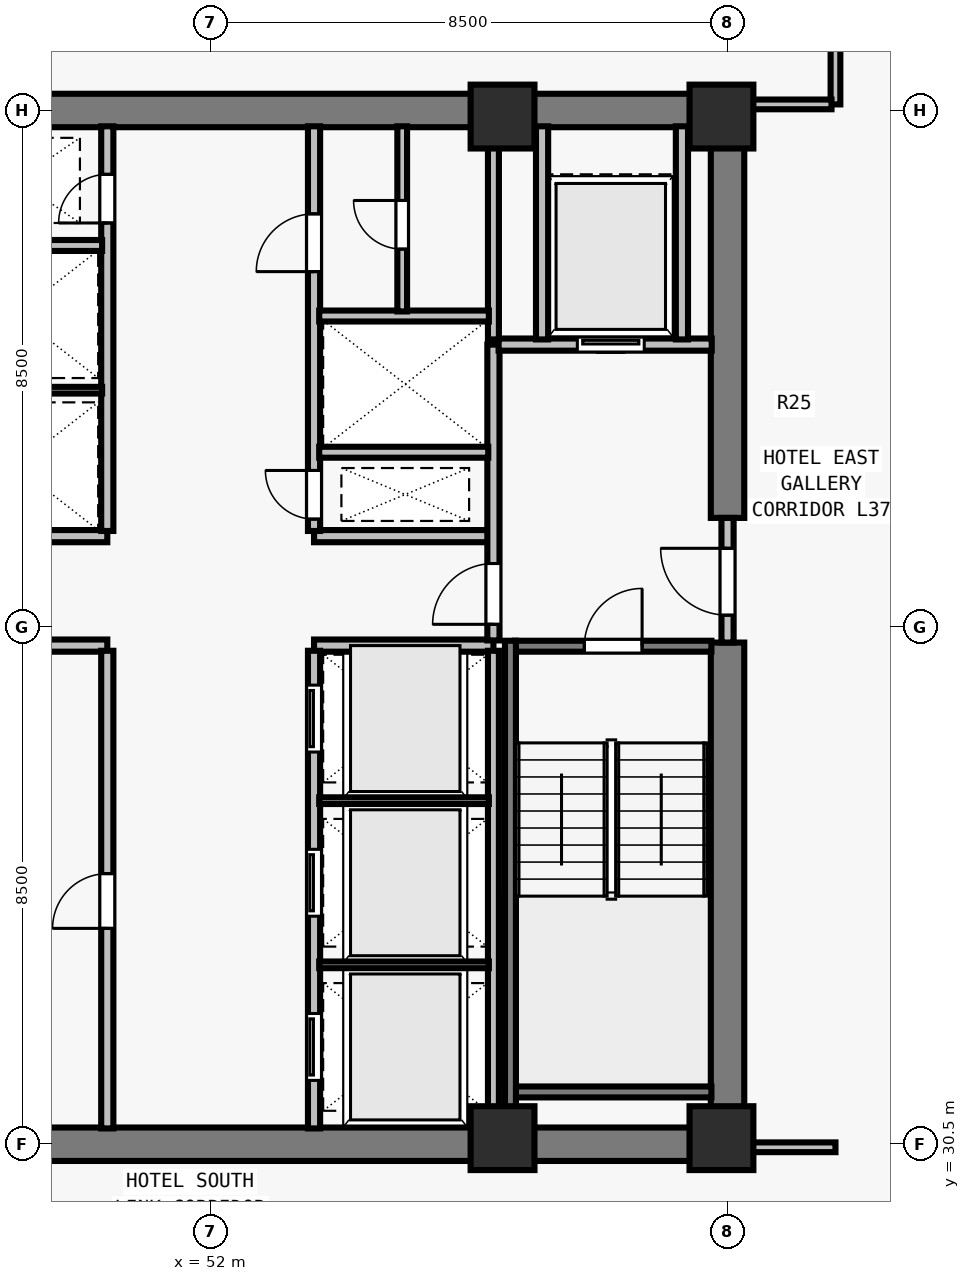
"""IFC4 building model, lengths in metres.
Left out: names, types, materials, properties, quantities, classifications, styles, units other than length and angle.
Written with IfcOpenShell. Run it as: python <this file> out.ifc"""

import sys

from ifc_helpers import new_model, si_unit, direction, frame, frame_2d, origin, origin_2d, place, context, subcontext, project, spatial, rectangle, extrude, element, fill, save


model = new_model("IFC4")
c1 = context("Model", 3, precision=1e-05, world=origin(), true_north=direction((0.0, 1.0)))
c2 = subcontext(c1, "Body", "Model", "MODEL_VIEW")
j1 = project(units=[si_unit("LENGTHUNIT", "METRE"), si_unit("PLANEANGLEUNIT", "RADIAN")], contexts=[c1])
p1 = place(None, origin())
s1 = spatial("IfcSite", under=j1, at=p1, CompositionType="ELEMENT")
p2 = place(p1, origin())
s2 = spatial("IfcBuilding", under=s1, at=p2, CompositionType="ELEMENT")
p3 = place(p2, frame((0.0, 0.0, 137.5)))
s3 = spatial("IfcBuildingStorey", under=s2, at=p3, CompositionType="ELEMENT", Elevation=137.5)
for number, where, z_axis, x_axis in (
    (1, (56.8, 30.6, 0.0), (0.0, 0.0, 1.0), (1.0, 0.0, 0.0)),
    (2, (60.4, 30.6, 0.0), (0.0, 0.0, 1.0), (1.0, 0.0, 0.0)),
    (3, (56.8, 47.4, 0.0), (0.0, 0.0, 1.0), (1.0, 0.0, 0.0)),
    (4, (60.4, 47.4, 0.0), (0.0, 0.0, 1.0), (1.0, 0.0, 0.0)),
):
    element("IfcColumn", number, at=place(p3, frame(where, z_axis=z_axis, x_axis=x_axis)), inside=s3, PredefinedType="COLUMN", context=c2, shape_type="SweptSolid", body=[
        extrude(rectangle(XDim=1.05, YDim=1.05, at=origin_2d()), origin(), (0.0, 0.0, 1.0), 3.5),
    ])
for number, where, z_axis, x_axis in (
    (5, (43.225, 30.5, 0.0), (0.0, 0.0, 1.0), (1.0, 0.0, 0.0)),
    (6, (43.225, 47.5, 0.0), (0.0, 0.0, 1.0), (1.0, 0.0, 0.0)),
):
    element("IfcWall", number, at=place(p3, frame(where, z_axis=z_axis, x_axis=x_axis)), inside=s3, PredefinedType="SHEAR", context=c2, shape_type="SweptSolid", body=[
        extrude(rectangle(XDim=17.55, YDim=0.55, at=frame_2d((8.775, 0.0))), origin(), (0.0, 0.0, 1.0), 3.28),
    ])
p4 = place(p3, frame((60.5, 30.765, 0.0), z_axis=(0.0, 0.0, 1.0), x_axis=(0.0, 1.0, 0.0)))
e7 = element("IfcWall", 7, at=p4, inside=s3, PredefinedType="SHEAR", context=c2, shape_type="SweptSolid", body=[
    extrude(rectangle(XDim=7.985, YDim=0.55, at=frame_2d((3.993, 0.0))), origin(), (0.0, 0.0, 1.0), 3.28),
])
p5 = place(p3, frame((60.5, 40.8, 0.0), z_axis=(0.0, 0.0, 1.0), x_axis=(0.0, 1.0, 0.0)))
e8 = element("IfcWall", 8, at=p5, inside=s3, PredefinedType="SHEAR", context=c2, shape_type="SweptSolid", body=[
    extrude(rectangle(XDim=6.435, YDim=0.55, at=frame_2d((3.218, 0.0))), origin(), (0.0, 0.0, 1.0), 3.28),
])
for number, where, z_axis, x_axis in (
    (9, (47.35, 38.7, 0.0), (0.0, 0.0, 1.0), (1.0, 0.0, 0.0)),
    (10, (47.35, 40.5, 0.0), (0.0, 0.0, 1.0), (1.0, 0.0, 0.0)),
    (11, (53.7, 38.7, 0.0), (0.0, 0.0, 1.0), (1.0, 0.0, 0.0)),
    (12, (53.7, 40.5, 0.0), (0.0, 0.0, 1.0), (1.0, 0.0, 0.0)),
):
    element("IfcWall", number, at=place(p3, frame(where, z_axis=z_axis, x_axis=x_axis)), inside=s3, PredefinedType="SOLIDWALL", context=c2, shape_type="SweptSolid", body=[
        extrude(rectangle(XDim=2.95, YDim=0.2, at=frame_2d((1.475, 0.0))), origin(), (0.0, 0.0, 1.0), 3.28),
    ])
p6 = place(p3, frame((50.3, 30.76, 0.0), z_axis=(0.0, 0.0, 1.0), x_axis=(0.0, 1.0, 0.0)))
e13 = element("IfcWall", 13, at=p6, inside=s3, PredefinedType="SOLIDWALL", context=c2, shape_type="SweptSolid", body=[
    extrude(rectangle(XDim=7.855, YDim=0.2, at=frame_2d((3.927, 0.0))), origin(), (0.0, 0.0, 1.0), 3.28),
])
p7 = place(p6, frame((3.29, 0.0, 0.0)))
e14 = element("IfcOpeningElement", 14, at=p7, cuts=e13, PredefinedType="OPENING", context=c2, shape_type="SweptSolid", body=[
    extrude(rectangle(XDim=0.9, YDim=2.12, at=frame_2d((0.45, 1.06))), frame((0.0, 0.11, 0.0), z_axis=(0.0, -1.0, 0.0), x_axis=(1.0, 0.0, 0.0)), (0.0, 0.0, 1.0), 0.22),
])
p8 = place(p3, frame((53.7, 30.76, 0.0), z_axis=(0.0, 0.0, 1.0), x_axis=(0.0, 1.0, 0.0)))
e15 = element("IfcWall", 15, at=p8, inside=s3, PredefinedType="SOLIDWALL", context=c2, shape_type="SweptSolid", body=[
    extrude(rectangle(XDim=7.855, YDim=0.2, at=frame_2d((3.927, 0.0))), origin(), (0.0, 0.0, 1.0), 3.28),
])
p9 = place(p8, frame((0.79, 0.0, 0.0)))
e16 = element("IfcOpeningElement", 16, at=p9, cuts=e15, PredefinedType="OPENING", context=c2, shape_type="SweptSolid", body=[
    extrude(rectangle(XDim=1.1, YDim=2.2, at=frame_2d((0.55, 1.1))), frame((0.0, 0.11, 0.0), z_axis=(0.0, -1.0, 0.0), x_axis=(1.0, 0.0, 0.0)), (0.0, 0.0, 1.0), 0.22),
])
p10 = place(p8, frame((3.49, 0.0, 0.0)))
e17 = element("IfcOpeningElement", 17, at=p10, cuts=e15, PredefinedType="OPENING", context=c2, shape_type="SweptSolid", body=[
    extrude(rectangle(XDim=1.1, YDim=2.2, at=frame_2d((0.55, 1.1))), frame((0.0, 0.11, 0.0), z_axis=(0.0, -1.0, 0.0), x_axis=(1.0, 0.0, 0.0)), (0.0, 0.0, 1.0), 0.22),
])
p11 = place(p8, frame((6.19, 0.0, 0.0)))
e18 = element("IfcOpeningElement", 18, at=p11, cuts=e15, PredefinedType="OPENING", context=c2, shape_type="SweptSolid", body=[
    extrude(rectangle(XDim=1.1, YDim=2.2, at=frame_2d((0.55, 1.1))), frame((0.0, 0.11, 0.0), z_axis=(0.0, -1.0, 0.0), x_axis=(1.0, 0.0, 0.0)), (0.0, 0.0, 1.0), 0.22),
])
p12 = place(p3, frame((50.3, 40.585, 0.0), z_axis=(0.0, 0.0, 1.0), x_axis=(0.0, 1.0, 0.0)))
e19 = element("IfcWall", 19, at=p12, inside=s3, PredefinedType="SOLIDWALL", context=c2, shape_type="SweptSolid", body=[
    extrude(rectangle(XDim=6.655, YDim=0.2, at=frame_2d((3.328, 0.0))), origin(), (0.0, 0.0, 1.0), 3.28),
])
p13 = place(p12, frame((5.065, 0.0, 0.0)))
e20 = element("IfcOpeningElement", 20, at=p13, cuts=e19, PredefinedType="OPENING", context=c2, shape_type="SweptSolid", body=[
    extrude(rectangle(XDim=0.8, YDim=2.08, at=frame_2d((0.4, 1.04))), frame((0.0, 0.11, 0.0), z_axis=(0.0, -1.0, 0.0), x_axis=(1.0, 0.0, 0.0)), (0.0, 0.0, 1.0), 0.22),
])
p14 = place(p3, frame((53.7, 40.585, 0.0), z_axis=(0.0, 0.0, 1.0), x_axis=(0.0, 1.0, 0.0)))
e21 = element("IfcWall", 21, at=p14, inside=s3, PredefinedType="SOLIDWALL", context=c2, shape_type="SweptSolid", body=[
    extrude(rectangle(XDim=6.655, YDim=0.2, at=frame_2d((3.328, 0.0))), origin(), (0.0, 0.0, 1.0), 3.28),
])
p15 = place(p14, frame((0.195, 0.0, 0.0)))
e22 = element("IfcOpeningElement", 22, at=p15, cuts=e21, PredefinedType="OPENING", context=c2, shape_type="SweptSolid", body=[
    extrude(rectangle(XDim=0.8, YDim=2.08, at=frame_2d((0.4, 1.04))), frame((0.0, 0.11, 0.0), z_axis=(0.0, -1.0, 0.0), x_axis=(1.0, 0.0, 0.0)), (0.0, 0.0, 1.0), 0.22),
])
p16 = place(p14, frame((4.265, 0.0, 0.0)))
e23 = element("IfcOpeningElement", 23, at=p16, cuts=e21, PredefinedType="OPENING", context=c2, shape_type="SweptSolid", body=[
    extrude(rectangle(XDim=0.95, YDim=2.12, at=frame_2d((0.475, 1.06))), frame((0.0, 0.11, 0.0), z_axis=(0.0, -1.0, 0.0), x_axis=(1.0, 0.0, 0.0)), (0.0, 0.0, 1.0), 0.22),
])
p17 = place(p3, frame((60.5, 38.75, 0.0), z_axis=(0.0, 0.0, 1.0), x_axis=(0.0, 1.0, 0.0)))
e24 = element("IfcWall", 24, at=p17, inside=s3, PredefinedType="SOLIDWALL", context=c2, shape_type="SweptSolid", body=[
    extrude(rectangle(XDim=2.05, YDim=0.2, at=frame_2d((1.025, 0.0))), origin(), (0.0, 0.0, 1.0), 3.28),
])
p18 = place(p17, frame((0.45, 0.0, 0.0)))
e25 = element("IfcOpeningElement", 25, at=p18, cuts=e24, PredefinedType="OPENING", context=c2, shape_type="SweptSolid", body=[
    extrude(rectangle(XDim=1.1, YDim=2.15, at=frame_2d((0.55, 1.075))), frame((0.0, 0.11, 0.0), z_axis=(0.0, -1.0, 0.0), x_axis=(1.0, 0.0, 0.0)), (0.0, 0.0, 1.0), 0.22),
])
p19 = place(p3, frame((56.65, 38.785, 0.0), z_axis=(0.0, 0.0, 1.0), x_axis=(0.0, 1.0, 0.0)))
e26 = element("IfcWall", 26, at=p19, inside=s3, PredefinedType="SOLIDWALL", context=c2, shape_type="SweptSolid", body=[
    extrude(rectangle(XDim=4.865, YDim=0.2, at=frame_2d((2.433, 0.0))), origin(), (0.0, 0.0, 1.0), 3.28),
])
p20 = place(p19, frame((0.265, 0.0, 0.0)))
e27 = element("IfcOpeningElement", 27, at=p20, cuts=e26, PredefinedType="OPENING", context=c2, shape_type="SweptSolid", body=[
    extrude(rectangle(XDim=1.0, YDim=2.15, at=frame_2d((0.5, 1.075))), frame((0.0, 0.11, 0.0), z_axis=(0.0, -1.0, 0.0), x_axis=(1.0, 0.0, 0.0)), (0.0, 0.0, 1.0), 0.22),
])
p21 = place(p3, frame((56.735, 43.65, 0.0), z_axis=(0.0, 0.0, 1.0), x_axis=(1.0, 0.0, 0.0)))
e28 = element("IfcWall", 28, at=p21, inside=s3, PredefinedType="SOLIDWALL", context=c2, shape_type="SweptSolid", body=[
    extrude(rectangle(XDim=3.505, YDim=0.2, at=frame_2d((1.752, 0.0))), origin(), (0.0, 0.0, 1.0), 3.28),
])
p22 = place(p21, frame((1.295, 0.0, 0.0)))
e29 = element("IfcOpeningElement", 29, at=p22, cuts=e28, PredefinedType="OPENING", context=c2, shape_type="SweptSolid", body=[
    extrude(rectangle(XDim=1.1, YDim=2.2, at=frame_2d((0.55, 1.1))), frame((0.0, 0.11, 0.0), z_axis=(0.0, -1.0, 0.0), x_axis=(1.0, 0.0, 0.0)), (0.0, 0.0, 1.0), 0.22),
])
for number, where, z_axis, x_axis in (
    (30, (57.45, 43.735, 0.0), (0.0, 0.0, 1.0), (0.0, 1.0, 0.0)),
    (31, (59.75, 43.735, 0.0), (0.0, 0.0, 1.0), (0.0, 1.0, 0.0)),
):
    element("IfcWall", number, at=place(p3, frame(where, z_axis=z_axis, x_axis=x_axis)), inside=s3, PredefinedType="SOLIDWALL", context=c2, shape_type="SweptSolid", body=[
        extrude(rectangle(XDim=3.505, YDim=0.2, at=frame_2d((1.752, 0.0))), origin(), (0.0, 0.0, 1.0), 3.28),
    ])
p23 = place(p3, frame((56.65, 30.76, 0.0), z_axis=(0.0, 0.0, 1.0), x_axis=(0.0, 1.0, 0.0)))
e32 = element("IfcWall", 32, at=p23, inside=s3, PredefinedType="SOLIDWALL", context=c2, shape_type="SweptSolid", body=[
    extrude(rectangle(XDim=7.855, YDim=0.18, at=frame_2d((3.927, 0.0))), origin(), (0.0, 0.0, 1.0), 3.28),
])
for number, where, z_axis, x_axis in (
    (33, (53.785, 33.45, 0.0), (0.0, 0.0, 1.0), (1.0, 0.0, 0.0)),
    (34, (53.785, 36.15, 0.0), (0.0, 0.0, 1.0), (1.0, 0.0, 0.0)),
):
    element("IfcWall", number, at=place(p3, frame(where, z_axis=z_axis, x_axis=x_axis)), inside=s3, PredefinedType="PARTITIONING", context=c2, shape_type="SweptSolid", body=[
        extrude(rectangle(XDim=2.79, YDim=0.11, at=frame_2d((1.395, 0.0))), origin(), (0.0, 0.0, 1.0), 3.28),
    ])
p24 = place(p3, frame((47.435, 42.9, 0.0), z_axis=(0.0, 0.0, 1.0), x_axis=(1.0, 0.0, 0.0)))
e35 = element("IfcWall", 35, at=p24, inside=s3, PredefinedType="PARTITIONING", context=c2, shape_type="SweptSolid", body=[
    extrude(rectangle(XDim=2.78, YDim=0.11, at=frame_2d((1.39, 0.0))), origin(), (0.0, 0.0, 1.0), 3.28),
])
p25 = place(p3, frame((47.425, 45.28, 0.0), z_axis=(0.0, 0.0, 1.0), x_axis=(1.0, 0.0, 0.0)))
e36 = element("IfcWall", 36, at=p25, inside=s3, PredefinedType="SOLIDWALL", context=c2, shape_type="SweptSolid", body=[
    extrude(rectangle(XDim=2.79, YDim=0.18, at=frame_2d((1.395, 0.0))), origin(), (0.0, 0.0, 1.0), 3.28),
])
p26 = place(p3, frame((56.65, 43.735, 0.0), z_axis=(0.0, 0.0, 1.0), x_axis=(0.0, 1.0, 0.0)))
e37 = element("IfcWall", 37, at=p26, inside=s3, PredefinedType="SOLIDWALL", context=c2, shape_type="SweptSolid", body=[
    extrude(rectangle(XDim=3.505, YDim=0.18, at=frame_2d((1.752, 0.0))), origin(), (0.0, 0.0, 1.0), 3.28),
])
p27 = place(p3, frame((53.785, 41.88, 0.0), z_axis=(0.0, 0.0, 1.0), x_axis=(1.0, 0.0, 0.0)))
e38 = element("IfcWall", 38, at=p27, inside=s3, PredefinedType="SOLIDWALL", context=c2, shape_type="SweptSolid", body=[
    extrude(rectangle(XDim=2.78, YDim=0.18, at=frame_2d((1.39, 0.0))), origin(), (0.0, 0.0, 1.0), 3.28),
])
p28 = place(p3, frame((53.785, 44.12, 0.0), z_axis=(0.0, 0.0, 1.0), x_axis=(1.0, 0.0, 0.0)))
e39 = element("IfcWall", 39, at=p28, inside=s3, PredefinedType="SOLIDWALL", context=c2, shape_type="SweptSolid", body=[
    extrude(rectangle(XDim=2.79, YDim=0.18, at=frame_2d((1.395, 0.0))), origin(), (0.0, 0.0, 1.0), 3.28),
])
p29 = place(p3, frame((55.15, 44.195, 0.0), z_axis=(0.0, 0.0, 1.0), x_axis=(0.0, 1.0, 0.0)))
e40 = element("IfcWall", 40, at=p29, inside=s3, PredefinedType="PARTITIONING", context=c2, shape_type="SweptSolid", body=[
    extrude(rectangle(XDim=3.045, YDim=0.16, at=frame_2d((1.522, 0.0))), origin(), (0.0, 0.0, 1.0), 3.28),
])
p30 = place(p29, frame((1.025, 0.0, 0.0)))
e41 = element("IfcOpeningElement", 41, at=p30, cuts=e40, PredefinedType="OPENING", context=c2, shape_type="SweptSolid", body=[
    extrude(rectangle(XDim=0.8, YDim=2.1, at=frame_2d((0.4, 1.05))), frame((0.0, 0.09, 0.0), z_axis=(0.0, -1.0, 0.0), x_axis=(1.0, 0.0, 0.0)), (0.0, 0.0, 1.0), 0.18),
])
p31 = place(p3, frame((62.275, 47.6, 0.0), z_axis=(0.0, 0.0, 1.0), x_axis=(0.0, 1.0, 0.0)))
e42 = element("IfcWall", 42, at=p31, inside=s3, PredefinedType="PARTITIONING", context=c2, shape_type="SweptSolid", body=[
    extrude(rectangle(XDim=15.075, YDim=0.16, at=frame_2d((7.538, 0.0))), origin(), (0.0, 0.0, 1.0), 2.555),
])
p32 = place(p3, frame((60.765, 30.45, 0.0), z_axis=(0.0, 0.0, 1.0), x_axis=(1.0, 0.0, 0.0)))
e43 = element("IfcWall", 43, at=p32, inside=s3, PredefinedType="PARTITIONING", context=c2, shape_type="SweptSolid", body=[
    extrude(rectangle(XDim=1.51, YDim=0.16, at=frame_2d((0.755, 0.0))), origin(), (0.0, 0.0, 1.0), 3.28),
])
p33 = place(p3, frame((60.765, 47.6, 0.0), z_axis=(0.0, 0.0, 1.0), x_axis=(1.0, 0.0, 0.0)))
e44 = element("IfcWall", 44, at=p33, inside=s3, PredefinedType="PARTITIONING", context=c2, shape_type="SweptSolid", body=[
    extrude(rectangle(XDim=1.445, YDim=0.16, at=frame_2d((0.723, 0.0))), origin(), (0.0, 0.0, 1.0), 3.28),
])
p34 = place(p3, frame((57.005, 38.69, 0.0), z_axis=(0.0, 0.0, 1.0), x_axis=(1.0, 0.0, 0.0)))
e45 = element("IfcWall", 45, at=p34, inside=s3, PredefinedType="SOLIDWALL", context=c2, shape_type="SweptSolid", body=[
    extrude(rectangle(XDim=3.23, YDim=0.18, at=frame_2d((1.615, 0.0))), origin(), (0.0, 0.0, 1.0), 3.28),
])
p35 = place(p34, frame((1.14, 0.0, 0.0)))
e46 = element("IfcOpeningElement", 46, at=p35, cuts=e45, PredefinedType="OPENING", context=c2, shape_type="SweptSolid", body=[
    extrude(rectangle(XDim=0.95, YDim=2.15, at=frame_2d((0.475, 1.075))), frame((0.0, 0.1, 0.0), z_axis=(0.0, -1.0, 0.0), x_axis=(1.0, 0.0, 0.0)), (0.0, 0.0, 1.0), 0.2),
])
p36 = place(p3, frame((57.005, 31.36, 0.0), z_axis=(0.0, 0.0, 1.0), x_axis=(1.0, 0.0, 0.0)))
e47 = element("IfcWall", 47, at=p36, inside=s3, PredefinedType="SOLIDWALL", context=c2, shape_type="SweptSolid", body=[
    extrude(rectangle(XDim=3.23, YDim=0.18, at=frame_2d((1.615, 0.0))), origin(), (0.0, 0.0, 1.0), 3.28),
])
p37 = place(p3, frame((56.93, 38.78, 0.0), z_axis=(0.0, 0.0, 1.0), x_axis=(0.0, -1.0, 0.0)))
e48 = element("IfcWall", 48, at=p37, inside=s3, PredefinedType="SOLIDWALL", context=c2, shape_type="SweptSolid", body=[
    extrude(rectangle(XDim=8.017, YDim=0.18, at=frame_2d((4.009, 0.0))), origin(), (0.0, 0.0, 1.0), 3.28),
])
p38 = place(p18, origin())
e49 = element("IfcDoor", 49, at=p38, inside=s3, OperationType="SINGLE_SWING_RIGHT", PredefinedType="DOOR", context=c2, shape_type="SweptSolid", body=[
    extrude(rectangle(XDim=1.1, YDim=2.15, at=frame_2d((0.55, 1.075))), frame((0.0, 0.025, 0.0), z_axis=(0.0, -1.0, 0.0), x_axis=(1.0, 0.0, 0.0)), (0.0, 0.0, 1.0), 0.05),
])
fill(e25, e49)
p39 = place(p20, origin())
e50 = element("IfcDoor", 50, at=p39, inside=s3, OperationType="SINGLE_SWING_LEFT", PredefinedType="DOOR", context=c2, shape_type="SweptSolid", body=[
    extrude(rectangle(XDim=1.0, YDim=2.15, at=frame_2d((0.5, 1.075))), frame((0.0, 0.025, 0.0), z_axis=(0.0, -1.0, 0.0), x_axis=(1.0, 0.0, 0.0)), (0.0, 0.0, 1.0), 0.05),
])
fill(e27, e50)
p40 = place(p22, origin())
e51 = element("IfcDoor", 51, at=p40, inside=s3, OperationType="SLIDING_TO_LEFT", PredefinedType="DOOR", context=c2, shape_type="SweptSolid", body=[
    extrude(rectangle(XDim=1.1, YDim=2.2, at=frame_2d((0.55, 1.1))), frame((0.0, 0.025, 0.0), z_axis=(0.0, -1.0, 0.0), x_axis=(1.0, 0.0, 0.0)), (0.0, 0.0, 1.0), 0.05),
])
fill(e29, e51)
p41 = place(p7, origin())
e52 = element("IfcDoor", 52, at=p41, inside=s3, OperationType="SINGLE_SWING_LEFT", PredefinedType="DOOR", context=c2, shape_type="SweptSolid", body=[
    extrude(rectangle(XDim=0.9, YDim=2.12, at=frame_2d((0.45, 1.06))), frame((0.0, 0.025, 0.0), z_axis=(0.0, -1.0, 0.0), x_axis=(1.0, 0.0, 0.0)), (0.0, 0.0, 1.0), 0.05),
])
fill(e14, e52)
p42 = place(p9, origin())
e53 = element("IfcDoor", 53, at=p42, inside=s3, OperationType="SLIDING_TO_LEFT", PredefinedType="DOOR", context=c2, shape_type="SweptSolid", body=[
    extrude(rectangle(XDim=1.1, YDim=2.2, at=frame_2d((0.55, 1.1))), frame((0.0, 0.025, 0.0), z_axis=(0.0, -1.0, 0.0), x_axis=(1.0, 0.0, 0.0)), (0.0, 0.0, 1.0), 0.05),
])
fill(e16, e53)
p43 = place(p10, origin())
e54 = element("IfcDoor", 54, at=p43, inside=s3, OperationType="SLIDING_TO_LEFT", PredefinedType="DOOR", context=c2, shape_type="SweptSolid", body=[
    extrude(rectangle(XDim=1.1, YDim=2.2, at=frame_2d((0.55, 1.1))), frame((0.0, 0.025, 0.0), z_axis=(0.0, -1.0, 0.0), x_axis=(1.0, 0.0, 0.0)), (0.0, 0.0, 1.0), 0.05),
])
fill(e17, e54)
p44 = place(p11, origin())
e55 = element("IfcDoor", 55, at=p44, inside=s3, OperationType="SLIDING_TO_LEFT", PredefinedType="DOOR", context=c2, shape_type="SweptSolid", body=[
    extrude(rectangle(XDim=1.1, YDim=2.2, at=frame_2d((0.55, 1.1))), frame((0.0, 0.025, 0.0), z_axis=(0.0, -1.0, 0.0), x_axis=(1.0, 0.0, 0.0)), (0.0, 0.0, 1.0), 0.05),
])
fill(e18, e55)
p45 = place(p13, origin())
e56 = element("IfcDoor", 56, at=p45, inside=s3, OperationType="SINGLE_SWING_LEFT", PredefinedType="DOOR", context=c2, shape_type="SweptSolid", body=[
    extrude(rectangle(XDim=0.8, YDim=2.08, at=frame_2d((0.4, 1.04))), frame((0.0, 0.025, 0.0), z_axis=(0.0, -1.0, 0.0), x_axis=(1.0, 0.0, 0.0)), (0.0, 0.0, 1.0), 0.05),
])
fill(e20, e56)
p46 = place(p15, origin())
e57 = element("IfcDoor", 57, at=p46, inside=s3, OperationType="SINGLE_SWING_RIGHT", PredefinedType="DOOR", context=c2, shape_type="SweptSolid", body=[
    extrude(rectangle(XDim=0.8, YDim=2.08, at=frame_2d((0.4, 1.04))), frame((0.0, 0.025, 0.0), z_axis=(0.0, -1.0, 0.0), x_axis=(1.0, 0.0, 0.0)), (0.0, 0.0, 1.0), 0.05),
])
fill(e22, e57)
p47 = place(p16, origin())
e58 = element("IfcDoor", 58, at=p47, inside=s3, OperationType="SINGLE_SWING_LEFT", PredefinedType="DOOR", context=c2, shape_type="SweptSolid", body=[
    extrude(rectangle(XDim=0.95, YDim=2.12, at=frame_2d((0.475, 1.06))), frame((0.0, 0.025, 0.0), z_axis=(0.0, -1.0, 0.0), x_axis=(1.0, 0.0, 0.0)), (0.0, 0.0, 1.0), 0.05),
])
fill(e23, e58)
p48 = place(p30, origin())
e59 = element("IfcDoor", 59, at=p48, inside=s3, OperationType="SINGLE_SWING_RIGHT", PredefinedType="DOOR", context=c2, shape_type="SweptSolid", body=[
    extrude(rectangle(XDim=0.8, YDim=2.1, at=frame_2d((0.4, 1.05))), frame((0.0, 0.025, 0.0), z_axis=(0.0, -1.0, 0.0), x_axis=(1.0, 0.0, 0.0)), (0.0, 0.0, 1.0), 0.05),
])
fill(e41, e59)
p49 = place(p35, origin())
e60 = element("IfcDoor", 60, at=p49, inside=s3, OperationType="SINGLE_SWING_RIGHT", PredefinedType="DOOR", context=c2, shape_type="SweptSolid", body=[
    extrude(rectangle(XDim=0.95, YDim=2.15, at=frame_2d((0.475, 1.075))), frame((0.0, 0.025, 0.0), z_axis=(0.0, -1.0, 0.0), x_axis=(1.0, 0.0, 0.0)), (0.0, 0.0, 1.0), 0.05),
])
fill(e46, e60)
save(model, sys.argv[1])
